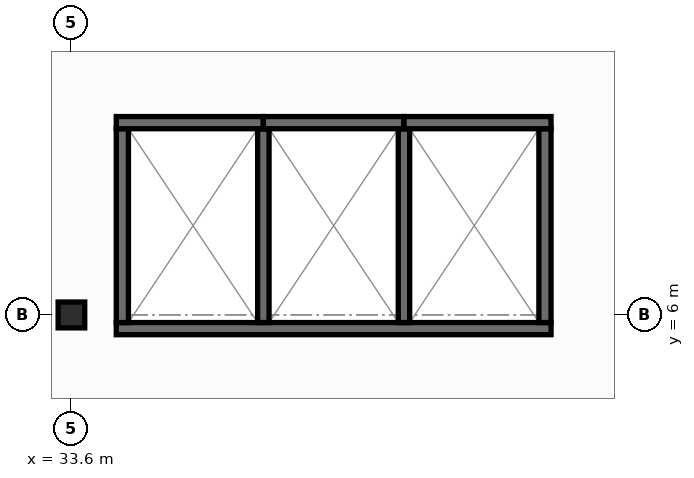
"""IFC4 building model, lengths in metres.
Left out: names, types, materials, properties, quantities, classifications, styles, units other than length and angle.
Written with IfcOpenShell. Run it as: python <this file> out.ifc"""

import sys

from ifc_helpers import new_model, si_unit, direction, frame, frame_2d, origin, origin_2d, place, context, subcontext, project, spatial, rectangle, i_section, extrude, element, save


model = new_model("IFC4")
c1 = context("Model", 3, precision=1e-05, world=origin(), true_north=direction((0.0, 1.0)))
c2 = subcontext(c1, "Body", "Model", "MODEL_VIEW")
j1 = project(units=[si_unit("LENGTHUNIT", "METRE"), si_unit("PLANEANGLEUNIT", "RADIAN")], contexts=[c1])
p1 = place(None, origin())
s1 = spatial("IfcSite", under=j1, at=p1, CompositionType="ELEMENT")
p2 = place(p1, origin())
s2 = spatial("IfcBuilding", under=s1, at=p2, CompositionType="ELEMENT")
p3 = place(p2, frame((0.0, 0.0, 50.15)))
s3 = spatial("IfcBuildingStorey", under=s2, at=p3, CompositionType="ELEMENT", Elevation=50.15)
p4 = place(p3, frame((33.6, 6.0, 0.0), z_axis=(0.0, 0.0, 1.0), x_axis=(1.0, 0.0, 0.0)))
e1 = element("IfcColumn", 1, at=p4, inside=s3, PredefinedType="COLUMN", context=c2, shape_type="SweptSolid", body=[
    extrude(i_section(OverallWidth=0.35, OverallDepth=0.34, WebThickness=0.016, FlangeThickness=0.028, at=origin_2d()), origin(), (0.0, 0.0, 1.0), 3.95),
])
p5 = place(p3, frame((34.19, 5.82, 0.0), z_axis=(0.0, 0.0, 1.0), x_axis=(1.0, 0.0, 0.0)))
e2 = element("IfcWall", 2, at=p5, inside=s3, PredefinedType="SHEAR", context=c2, shape_type="SweptSolid", body=[
    extrude(rectangle(XDim=5.72, YDim=0.16, at=frame_2d((2.86, 0.0))), origin(), (0.0, 0.0, 1.0), 3.71),
])
for number, where, z_axis, x_axis in (
    (3, (34.27, 5.9, 0.0), (0.0, 0.0, 1.0), (0.0, 1.0, 0.0)),
    (4, (39.83, 5.9, 0.0), (0.0, 0.0, 1.0), (0.0, 1.0, 0.0)),
):
    element("IfcWall", number, at=place(p3, frame(where, z_axis=z_axis, x_axis=x_axis)), inside=s3, PredefinedType="SHEAR", context=c2, shape_type="SweptSolid", body=[
        extrude(rectangle(XDim=2.55, YDim=0.16, at=frame_2d((1.275, 0.0))), origin(), (0.0, 0.0, 1.0), 3.71),
    ])
for number, where, z_axis, x_axis in (
    (5, (36.125, 5.9, 0.0), (0.0, 0.0, 1.0), (0.0, 1.0, 0.0)),
    (6, (37.975, 5.9, 0.0), (0.0, 0.0, 1.0), (0.0, 1.0, 0.0)),
):
    element("IfcWall", number, at=place(p3, frame(where, z_axis=z_axis, x_axis=x_axis)), inside=s3, PredefinedType="SHEAR", context=c2, shape_type="SweptSolid", body=[
        extrude(rectangle(XDim=2.55, YDim=0.15, at=frame_2d((1.275, 0.0))), origin(), (0.0, 0.0, 1.0), 3.71),
    ])
p6 = place(p3, frame((34.19, 8.53, 0.0), z_axis=(0.0, 0.0, 1.0), x_axis=(1.0, 0.0, 0.0)))
e7 = element("IfcWall", 7, at=p6, inside=s3, PredefinedType="SHEAR", context=c2, shape_type="SweptSolid", body=[
    extrude(rectangle(XDim=1.935, YDim=0.16, at=frame_2d((0.968, 0.0))), origin(), (0.0, 0.0, 1.0), 3.71),
])
p7 = place(p3, frame((36.125, 8.53, 0.0), z_axis=(0.0, 0.0, 1.0), x_axis=(1.0, 0.0, 0.0)))
e8 = element("IfcWall", 8, at=p7, inside=s3, PredefinedType="SHEAR", context=c2, shape_type="SweptSolid", body=[
    extrude(rectangle(XDim=1.85, YDim=0.16, at=frame_2d((0.925, 0.0))), origin(), (0.0, 0.0, 1.0), 3.71),
])
p8 = place(p3, frame((37.975, 8.53, 0.0), z_axis=(0.0, 0.0, 1.0), x_axis=(1.0, 0.0, 0.0)))
e9 = element("IfcWall", 9, at=p8, inside=s3, PredefinedType="SHEAR", context=c2, shape_type="SweptSolid", body=[
    extrude(rectangle(XDim=1.935, YDim=0.16, at=frame_2d((0.967, 0.0))), origin(), (0.0, 0.0, 1.0), 3.71),
])
save(model, sys.argv[1])
